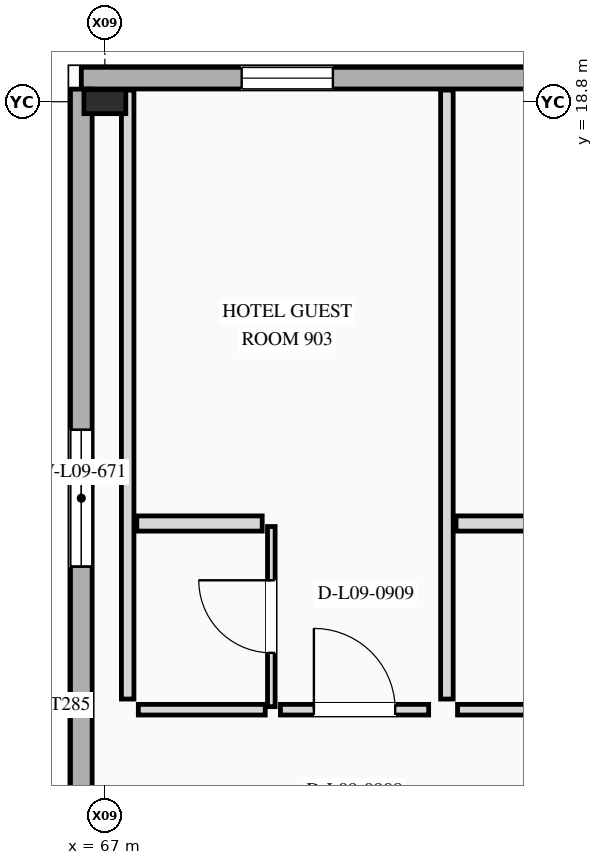
"""IFC4 building model, lengths in metres.
Left out: names, types, materials, properties, quantities, classifications, styles, units other than length and angle.
Written with IfcOpenShell. Run it as: python <this file> out.ifc"""

import sys

from ifc_helpers import new_model, si_unit, direction, frame, frame_2d, origin, origin_2d, place, context, subcontext, project, spatial, rectangle, i_section, extrude, element, fill, save


model = new_model("IFC4")
c1 = context("Model", 3, precision=1e-05, world=origin(), true_north=direction((0.0, 1.0)))
c2 = subcontext(c1, "Body", "Model", "MODEL_VIEW")
j1 = project(units=[si_unit("LENGTHUNIT", "METRE"), si_unit("PLANEANGLEUNIT", "RADIAN")], contexts=[c1])
p1 = place(None, origin())
s1 = spatial("IfcSite", under=j1, at=p1, CompositionType="ELEMENT")
p2 = place(p1, origin())
s2 = spatial("IfcBuilding", under=s1, at=p2, CompositionType="ELEMENT")
p3 = place(p2, frame((0.0, 0.0, 37.6)))
s3 = spatial("IfcBuildingStorey", under=s2, at=p3, CompositionType="ELEMENT", Elevation=37.6)
p4 = place(p3, frame((67.0, 18.8, 0.0), z_axis=(0.0, 0.0, 1.0), x_axis=(0.0, 1.0, 0.0)))
e1 = element("IfcColumn", 1, at=p4, inside=s3, PredefinedType="COLUMN", context=c2, shape_type="SweptSolid", body=[
    extrude(i_section(OverallWidth=0.315, OverallDepth=0.551, WebThickness=0.015, FlangeThickness=0.024, at=origin_2d()), origin(), (0.0, 0.0, 1.0), 3.5),
])
p5 = place(p3, frame((76.0, 19.11, 0.0), z_axis=(0.0, 0.0, 1.0), x_axis=(-1.0, 0.0, 0.0)))
e2 = element("IfcWall", 2, at=p5, inside=s3, PredefinedType="STANDARD", context=c2, shape_type="SweptSolid", body=[
    extrude(rectangle(XDim=9.31, YDim=0.285, at=frame_2d((4.655, 0.0))), origin(), (0.0, 0.0, 1.0), 3.5),
])
p6 = place(p5, frame((6.0, 0.0, 0.85)))
e3 = element("IfcOpeningElement", 3, at=p6, cuts=e2, PredefinedType="OPENING", context=c2, shape_type="SweptSolid", body=[
    extrude(rectangle(XDim=1.2, YDim=1.6, at=frame_2d((0.6, 0.8))), frame((0.0, 0.152, 0.0), z_axis=(0.0, -1.0, 0.0), x_axis=(1.0, 0.0, 0.0)), (0.0, 0.0, 1.0), 0.305),
])
p7 = place(p5, frame((1.85, 0.0, 0.85)))
e4 = element("IfcOpeningElement", 4, at=p7, cuts=e2, PredefinedType="OPENING", context=c2, shape_type="SweptSolid", body=[
    extrude(rectangle(XDim=1.1, YDim=1.5, at=frame_2d((0.55, 0.75))), frame((0.0, 0.152, 0.0), z_axis=(0.0, -1.0, 0.0), x_axis=(1.0, 0.0, 0.0)), (0.0, 0.0, 1.0), 0.305),
])
p8 = place(p3, frame((66.69, 18.966, 0.0), z_axis=(0.0, 0.0, 1.0), x_axis=(0.0, -1.0, 0.0)))
e5 = element("IfcWall", 5, at=p8, inside=s3, PredefinedType="STANDARD", context=c2, shape_type="SweptSolid", body=[
    extrude(rectangle(XDim=10.766, YDim=0.285, at=frame_2d((5.383, 0.0))), origin(), (0.0, 0.0, 1.0), 3.5),
])
p9 = place(p8, frame((4.483, 0.0, 0.88)))
e6 = element("IfcOpeningElement", 6, at=p9, cuts=e5, PredefinedType="OPENING", context=c2, shape_type="SweptSolid", body=[
    extrude(rectangle(XDim=1.8, YDim=1.8, at=frame_2d((0.9, 0.9))), frame((0.0, 0.152, 0.0), z_axis=(0.0, -1.0, 0.0), x_axis=(1.0, 0.0, 0.0)), (0.0, 0.0, 1.0), 0.305),
])
p10 = place(p3, frame((67.44, 10.8, 0.0), z_axis=(0.0, 0.0, 1.0), x_axis=(1.0, 0.0, 0.0)))
e7 = element("IfcWall", 7, at=p10, inside=s3, PredefinedType="PARTITIONING", context=c2, shape_type="SweptSolid", body=[
    extrude(rectangle(XDim=1.67, YDim=0.14, at=frame_2d((0.835, 0.0))), origin(), (0.0, 0.0, 1.0), 3.2),
])
p11 = place(p3, frame((69.31, 10.8, 0.0), z_axis=(0.0, 0.0, 1.0), x_axis=(1.0, 0.0, 0.0)))
e8 = element("IfcWall", 8, at=p11, inside=s3, PredefinedType="PARTITIONING", context=c2, shape_type="SweptSolid", body=[
    extrude(rectangle(XDim=1.95, YDim=0.14, at=frame_2d((0.975, 0.0))), origin(), (0.0, 0.0, 1.0), 3.2),
])
p12 = place(p11, frame((0.44, 0.0, 0.0)))
e9 = element("IfcOpeningElement", 9, at=p12, cuts=e8, PredefinedType="OPENING", context=c2, shape_type="SweptSolid", body=[
    extrude(rectangle(XDim=1.07, YDim=2.4, at=frame_2d((0.535, 1.2))), frame((0.0, 0.08, 0.0), z_axis=(0.0, -1.0, 0.0), x_axis=(1.0, 0.0, 0.0)), (0.0, 0.0, 1.0), 0.16),
])
p13 = place(p3, frame((67.3, 10.94, 0.0), z_axis=(0.0, 0.0, 1.0), x_axis=(0.0, 1.0, 0.0)))
e10 = element("IfcWall", 10, at=p13, inside=s3, PredefinedType="PARTITIONING", context=c2, shape_type="SweptSolid", body=[
    extrude(rectangle(XDim=8.012, YDim=0.165, at=frame_2d((4.006, 0.0))), origin(), (0.0, 0.0, 1.0), 2.529),
])
p14 = place(p3, frame((71.5, 10.94, 0.0), z_axis=(0.0, 0.0, 1.0), x_axis=(0.0, 1.0, 0.0)))
e11 = element("IfcWall", 11, at=p14, inside=s3, PredefinedType="PARTITIONING", context=c2, shape_type="SweptSolid", body=[
    extrude(rectangle(XDim=8.012, YDim=0.165, at=frame_2d((4.006, 0.0))), origin(), (0.0, 0.0, 1.0), 2.613),
])
p15 = place(p3, frame((69.19, 10.84, 0.0), z_axis=(0.0, 0.0, 1.0), x_axis=(0.0, 1.0, 0.0)))
e12 = element("IfcWall", 12, at=p15, inside=s3, PredefinedType="PARTITIONING", context=c2, shape_type="SweptSolid", body=[
    extrude(rectangle(XDim=2.37, YDim=0.1, at=frame_2d((1.185, 0.0))), origin(), (0.0, 0.0, 1.0), 2.808),
])
p16 = place(p15, frame((0.708, 0.0, 0.0)))
e13 = element("IfcOpeningElement", 13, at=p16, cuts=e12, PredefinedType="OPENING", context=c2, shape_type="SweptSolid", body=[
    extrude(rectangle(XDim=0.955, YDim=2.14, at=frame_2d((0.478, 1.07))), frame((0.0, 0.06, 0.0), z_axis=(0.0, -1.0, 0.0), x_axis=(1.0, 0.0, 0.0)), (0.0, 0.0, 1.0), 0.12),
])
p17 = place(p3, frame((67.42, 13.25, 0.0), z_axis=(0.0, 0.0, 1.0), x_axis=(1.0, 0.0, 0.0)))
e14 = element("IfcWall", 14, at=p17, inside=s3, PredefinedType="PLUMBINGWALL", context=c2, shape_type="SweptSolid", body=[
    extrude(rectangle(XDim=1.65, YDim=0.2, at=frame_2d((0.825, 0.0))), origin(), (0.0, 0.0, 1.0), 3.2),
])
p18 = place(p3, frame((71.64, 10.8, 0.0), z_axis=(0.0, 0.0, 1.0), x_axis=(1.0, 0.0, 0.0)))
e15 = element("IfcWall", 15, at=p18, inside=s3, PredefinedType="PARTITIONING", context=c2, shape_type="SweptSolid", body=[
    extrude(rectangle(XDim=1.67, YDim=0.14, at=frame_2d((0.835, 0.0))), origin(), (0.0, 0.0, 1.0), 3.2),
])
p19 = place(p3, frame((71.62, 13.25, 0.0), z_axis=(0.0, 0.0, 1.0), x_axis=(1.0, 0.0, 0.0)))
e16 = element("IfcWall", 16, at=p19, inside=s3, PredefinedType="PLUMBINGWALL", context=c2, shape_type="SweptSolid", body=[
    extrude(rectangle(XDim=1.65, YDim=0.2, at=frame_2d((0.825, 0.0))), origin(), (0.0, 0.0, 1.0), 3.2),
])
p20 = place(p6, origin())
e17 = element("IfcWindow", 17, at=p20, inside=s3, PartitioningType="SINGLE_PANEL", PredefinedType="WINDOW", context=c2, shape_type="SweptSolid", body=[
    extrude(rectangle(XDim=1.2, YDim=1.6, at=frame_2d((0.6, 0.8))), frame((0.0, 0.03, 0.0), z_axis=(0.0, -1.0, 0.0), x_axis=(1.0, 0.0, 0.0)), (0.0, 0.0, 1.0), 0.06),
])
fill(e3, e17)
p21 = place(p9, origin())
e18 = element("IfcWindow", 18, at=p21, inside=s3, PartitioningType="SINGLE_PANEL", PredefinedType="WINDOW", context=c2, shape_type="SweptSolid", body=[
    extrude(rectangle(XDim=1.8, YDim=1.8, at=frame_2d((0.9, 0.9))), frame((0.0, 0.03, 0.0), z_axis=(0.0, -1.0, 0.0), x_axis=(1.0, 0.0, 0.0)), (0.0, 0.0, 1.0), 0.06),
])
fill(e6, e18)
p22 = place(p12, origin())
e19 = element("IfcDoor", 19, at=p22, inside=s3, OperationType="SINGLE_SWING_LEFT", PredefinedType="DOOR", context=c2, shape_type="SweptSolid", body=[
    extrude(rectangle(XDim=1.07, YDim=2.4, at=frame_2d((0.535, 1.2))), frame((0.0, 0.025, 0.0), z_axis=(0.0, -1.0, 0.0), x_axis=(1.0, 0.0, 0.0)), (0.0, 0.0, 1.0), 0.05),
])
fill(e9, e19)
p23 = place(p16, origin())
e20 = element("IfcDoor", 20, at=p23, inside=s3, OperationType="SINGLE_SWING_RIGHT", PredefinedType="DOOR", context=c2, shape_type="SweptSolid", body=[
    extrude(rectangle(XDim=0.955, YDim=2.14, at=frame_2d((0.478, 1.07))), frame((0.0, 0.025, 0.0), z_axis=(0.0, -1.0, 0.0), x_axis=(1.0, 0.0, 0.0)), (0.0, 0.0, 1.0), 0.05),
])
fill(e13, e20)
save(model, sys.argv[1])
